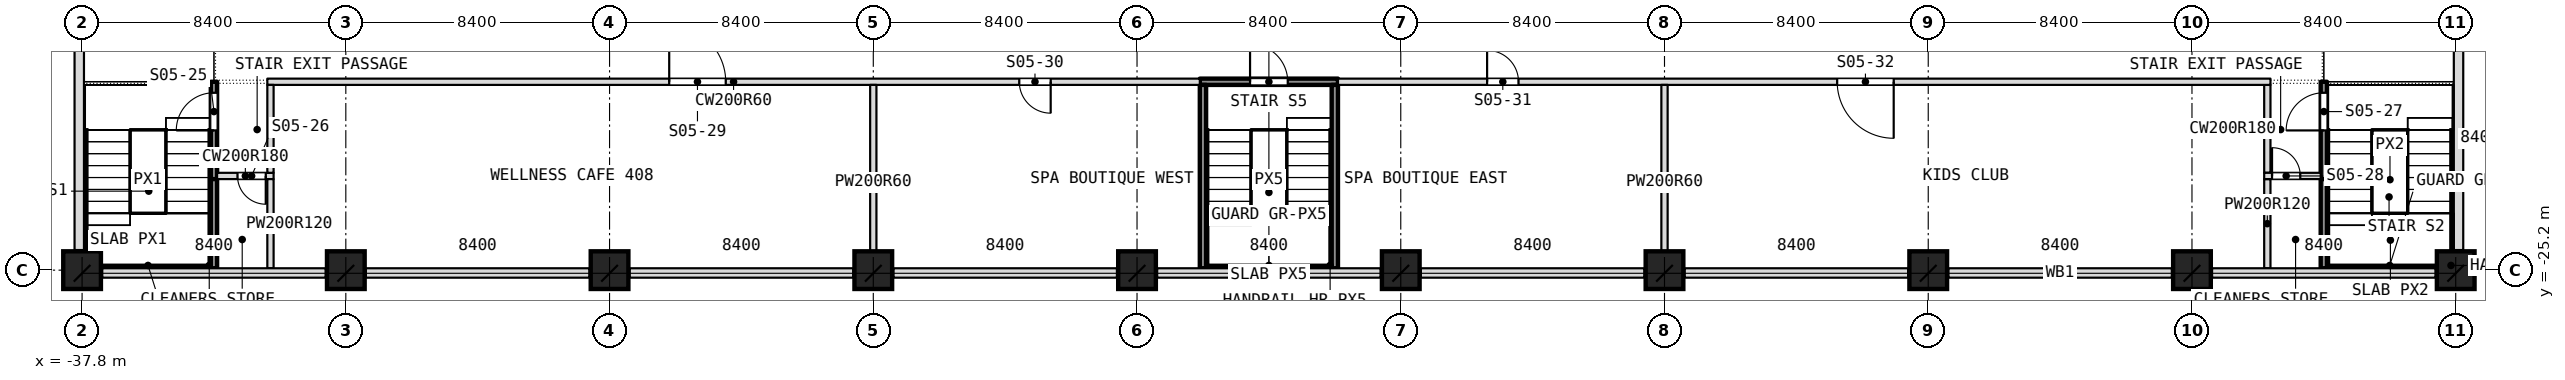
"""IFC4 building model, lengths in metres.
Left out: names, types, materials, properties, quantities, classifications, styles, units other than length and angle.
Written with IfcOpenShell. Run it as: python <this file> out.ifc"""

import sys

from ifc_helpers import new_model, si_unit, direction, frame, frame_2d, origin, origin_2d, place, context, subcontext, project, spatial, polyline, rectangle, outline, extrude, element, fill, save


model = new_model("IFC4")
c1 = context("Model", 3, precision=1e-05, world=origin(), true_north=direction((0.0, 1.0)))
c2 = subcontext(c1, "Body", "Model", "MODEL_VIEW")
j1 = project(units=[si_unit("LENGTHUNIT", "METRE"), si_unit("PLANEANGLEUNIT", "RADIAN")], contexts=[c1])
p1 = place(None, origin())
s1 = spatial("IfcSite", under=j1, at=p1, CompositionType="ELEMENT")
p2 = place(p1, origin())
s2 = spatial("IfcBuilding", under=s1, at=p2, CompositionType="ELEMENT")
p3 = place(p2, frame((0.0, 0.0, 26.0)))
s3 = spatial("IfcBuildingStorey", under=s2, at=p3, CompositionType="ELEMENT", Elevation=26.0)
for number, where, z_axis, x_axis in (
    (1, (-37.8, -25.2, 0.0), (0.0, 0.0, 1.0), (1.0, 0.0, 0.0)),
    (2, (-29.4, -25.2, 0.0), (0.0, 0.0, 1.0), (1.0, 0.0, 0.0)),
    (3, (-21.0, -25.2, 0.0), (0.0, 0.0, 1.0), (1.0, 0.0, 0.0)),
    (4, (-12.6, -25.2, 0.0), (0.0, 0.0, 1.0), (1.0, 0.0, 0.0)),
    (5, (-4.2, -25.2, 0.0), (0.0, 0.0, 1.0), (1.0, 0.0, 0.0)),
    (6, (4.2, -25.2, 0.0), (0.0, 0.0, 1.0), (1.0, 0.0, 0.0)),
    (7, (12.6, -25.2, 0.0), (0.0, 0.0, 1.0), (1.0, 0.0, 0.0)),
    (8, (21.0, -25.2, 0.0), (0.0, 0.0, 1.0), (1.0, 0.0, 0.0)),
    (9, (29.4, -25.2, 0.0), (0.0, 0.0, 1.0), (1.0, 0.0, 0.0)),
    (10, (37.8, -25.2, 0.0), (0.0, 0.0, 1.0), (1.0, 0.0, 0.0)),
):
    element("IfcColumn", number, at=place(p3, frame(where, z_axis=z_axis, x_axis=x_axis)), inside=s3, PredefinedType="COLUMN", context=c2, shape_type="SweptSolid", body=[
        extrude(rectangle(XDim=1.2, YDim=1.2, at=origin_2d()), origin(), (0.0, 0.0, 1.0), 5.0),
    ])
p4 = place(p3, frame((37.8, 2.4, 0.0), z_axis=(1.0, 0.0, 0.0), x_axis=(0.0, 0.0, 1.0)))
e11 = element("IfcWall", 11, at=p4, inside=s3, PredefinedType="SOLIDWALL", context=c2, shape_type="SweptSolid", body=[
    extrude(outline(polyline([(0.0, 0.0), (4.68, 0.0), (4.68, 21.6), (0.0, 21.6), (0.0, 16.321), (0.541, 15.6), (1.199, 14.4), (1.65, 13.2), (1.913, 12.0), (2.0, 10.8), (1.913, 9.6), (1.65, 8.4), (1.199, 7.2), (0.541, 6.0), (0.0, 5.279), (0.0, 0.0)])), origin(), (0.0, 0.0, -1.0), 4.2),
])
p5 = place(p3, frame((-37.8, 2.4, 0.0), z_axis=(-1.0, 0.0, 0.0), x_axis=(0.0, -1.0, 0.0)))
e12 = element("IfcWall", 12, at=p5, inside=s3, PredefinedType="SOLIDWALL", context=c2, shape_type="SweptSolid", body=[
    extrude(outline(polyline([(0.0, 0.0), (5.279, 0.0), (6.0, 0.541), (7.2, 1.199), (8.4, 1.65), (9.6, 1.913), (10.8, 2.0), (12.0, 1.913), (13.2, 1.65), (14.4, 1.199), (15.6, 0.541), (16.321, 0.0), (21.6, 0.0), (21.6, 4.68), (0.0, 4.68), (0.0, 0.0)])), origin(), (0.0, 0.0, -1.0), 4.2),
])
p6 = place(p3, frame((33.6, -25.14, 0.0), z_axis=(0.0, 0.0, 1.0), x_axis=(0.0, 1.0, 0.0)))
e13 = element("IfcWall", 13, at=p6, inside=s3, PredefinedType="PARTITIONING", context=c2, shape_type="SweptSolid", body=[
    extrude(rectangle(XDim=3.04, YDim=0.2, at=frame_2d((1.52, 0.0))), origin(), (0.0, 0.0, 1.0), 4.68),
])
p7 = place(p3, frame((33.6, -22.3, 0.0), z_axis=(0.0, 0.0, 1.0), x_axis=(0.0, 1.0, 0.0)))
e14 = element("IfcWall", 14, at=p7, inside=s3, PredefinedType="PARTITIONING", context=c2, shape_type="SweptSolid", body=[
    extrude(rectangle(XDim=3.1, YDim=0.2, at=frame_2d((1.55, 0.0))), origin(), (0.0, 0.0, 1.0), 4.68),
])
p8 = place(p7, frame((1.55, 0.0, 0.0)))
e15 = element("IfcOpeningElement", 15, at=p8, cuts=e14, PredefinedType="OPENING", context=c2, shape_type="SweptSolid", body=[
    extrude(rectangle(XDim=1.2, YDim=2.1, at=frame_2d((0.6, 1.05))), frame((0.0, 0.1, 0.0), z_axis=(0.0, -1.0, 0.0), x_axis=(1.0, 0.0, 0.0)), (0.0, 0.0, 1.0), 0.2),
])
p9 = place(p3, frame((31.8, -25.14, 0.0), z_axis=(0.0, 0.0, 1.0), x_axis=(0.0, 1.0, 0.0)))
e16 = element("IfcWall", 16, at=p9, inside=s3, PredefinedType="PARTITIONING", context=c2, shape_type="SweptSolid", body=[
    extrude(rectangle(XDim=2.84, YDim=0.2, at=frame_2d((1.42, 0.0))), origin(), (0.0, 0.0, 1.0), 4.68),
])
p10 = place(p3, frame((31.8, -22.1, 0.0), z_axis=(0.0, 0.0, 1.0), x_axis=(0.0, 1.0, 0.0)))
e17 = element("IfcWall", 17, at=p10, inside=s3, PredefinedType="PARTITIONING", context=c2, shape_type="SweptSolid", body=[
    extrude(rectangle(XDim=2.8, YDim=0.2, at=frame_2d((1.4, 0.0))), origin(), (0.0, 0.0, 1.0), 4.68),
])
p11 = place(p3, frame((-33.5, -22.2, 0.0), z_axis=(0.0, 0.0, 1.0), x_axis=(1.0, 0.0, 0.0)))
e18 = element("IfcWall", 18, at=p11, inside=s3, PredefinedType="PARTITIONING", context=c2, shape_type="SweptSolid", body=[
    extrude(rectangle(XDim=1.8, YDim=0.2, at=frame_2d((0.9, 0.0))), origin(), (0.0, 0.0, 1.0), 4.68),
])
p12 = place(p11, frame((0.65, 0.0, 0.0)))
e19 = element("IfcOpeningElement", 19, at=p12, cuts=e18, PredefinedType="OPENING", context=c2, shape_type="SweptSolid", body=[
    extrude(rectangle(XDim=0.9, YDim=2.1, at=frame_2d((0.45, 1.05))), frame((0.0, 0.1, 0.0), z_axis=(0.0, -1.0, 0.0), x_axis=(1.0, 0.0, 0.0)), (0.0, 0.0, 1.0), 0.2),
])
p13 = place(p3, frame((31.7, -22.2, 0.0), z_axis=(0.0, 0.0, 1.0), x_axis=(1.0, 0.0, 0.0)))
e20 = element("IfcWall", 20, at=p13, inside=s3, PredefinedType="PARTITIONING", context=c2, shape_type="SweptSolid", body=[
    extrude(rectangle(XDim=1.8, YDim=0.2, at=frame_2d((0.9, 0.0))), origin(), (0.0, 0.0, 1.0), 4.68),
])
p14 = place(p13, frame((0.25, 0.0, 0.0)))
e21 = element("IfcOpeningElement", 21, at=p14, cuts=e20, PredefinedType="OPENING", context=c2, shape_type="SweptSolid", body=[
    extrude(rectangle(XDim=0.9, YDim=2.1, at=frame_2d((0.45, 1.05))), frame((0.0, 0.1, 0.0), z_axis=(0.0, -1.0, 0.0), x_axis=(1.0, 0.0, 0.0)), (0.0, 0.0, 1.0), 0.2),
])
p15 = place(p3, frame((-31.9, -19.2, 0.0), z_axis=(0.0, 0.0, 1.0), x_axis=(1.0, 0.0, 0.0)))
e22 = element("IfcWall", 22, at=p15, inside=s3, PredefinedType="PARTITIONING", context=c2, shape_type="SweptSolid", body=[
    extrude(rectangle(XDim=29.7, YDim=0.2, at=frame_2d((14.85, 0.0))), origin(), (0.0, 0.0, 1.0), 4.68),
])
p16 = place(p15, frame((12.8, 0.0, 0.0)))
e23 = element("IfcOpeningElement", 23, at=p16, cuts=e22, PredefinedType="OPENING", context=c2, shape_type="SweptSolid", body=[
    extrude(rectangle(XDim=1.8, YDim=2.1, at=frame_2d((0.9, 1.05))), frame((0.0, 0.1, 0.0), z_axis=(0.0, -1.0, 0.0), x_axis=(1.0, 0.0, 0.0)), (0.0, 0.0, 1.0), 0.2),
])
p17 = place(p15, frame((23.95, 0.0, 0.0)))
e24 = element("IfcOpeningElement", 24, at=p17, cuts=e22, PredefinedType="OPENING", context=c2, shape_type="SweptSolid", body=[
    extrude(rectangle(XDim=1.0, YDim=2.1, at=frame_2d((0.5, 1.05))), frame((0.0, 0.1, 0.0), z_axis=(0.0, -1.0, 0.0), x_axis=(1.0, 0.0, 0.0)), (0.0, 0.0, 1.0), 0.2),
])
p18 = place(p3, frame((2.2, -19.2, 0.0), z_axis=(0.0, 0.0, 1.0), x_axis=(1.0, 0.0, 0.0)))
e25 = element("IfcWall", 25, at=p18, inside=s3, PredefinedType="PARTITIONING", context=c2, shape_type="SweptSolid", body=[
    extrude(rectangle(XDim=29.7, YDim=0.2, at=frame_2d((14.85, 0.0))), origin(), (0.0, 0.0, 1.0), 4.68),
])
p19 = place(p18, frame((4.75, 0.0, 0.0)))
e26 = element("IfcOpeningElement", 26, at=p19, cuts=e25, PredefinedType="OPENING", context=c2, shape_type="SweptSolid", body=[
    extrude(rectangle(XDim=1.0, YDim=2.1, at=frame_2d((0.5, 1.05))), frame((0.0, 0.1, 0.0), z_axis=(0.0, -1.0, 0.0), x_axis=(1.0, 0.0, 0.0)), (0.0, 0.0, 1.0), 0.2),
])
p20 = place(p18, frame((15.9, 0.0, 0.0)))
e27 = element("IfcOpeningElement", 27, at=p20, cuts=e25, PredefinedType="OPENING", context=c2, shape_type="SweptSolid", body=[
    extrude(rectangle(XDim=1.8, YDim=2.1, at=frame_2d((0.9, 1.05))), frame((0.0, 0.1, 0.0), z_axis=(0.0, -1.0, 0.0), x_axis=(1.0, 0.0, 0.0)), (0.0, 0.0, 1.0), 0.2),
])
p21 = place(p3, frame((-2.2, -19.2, 0.0), z_axis=(0.0, 0.0, 1.0), x_axis=(1.0, 0.0, 0.0)))
e28 = element("IfcWall", 28, at=p21, inside=s3, PredefinedType="PARTITIONING", context=c2, shape_type="SweptSolid", body=[
    extrude(rectangle(XDim=4.4, YDim=0.2, at=frame_2d((2.2, 0.0))), origin(), (0.0, 0.0, 1.0), 4.68),
])
p22 = place(p21, frame((1.6, 0.0, 0.0)))
e29 = element("IfcOpeningElement", 29, at=p22, cuts=e28, PredefinedType="OPENING", context=c2, shape_type="SweptSolid", body=[
    extrude(rectangle(XDim=1.2, YDim=2.1, at=frame_2d((0.6, 1.05))), frame((0.0, 0.1, 0.0), z_axis=(0.0, -1.0, 0.0), x_axis=(1.0, 0.0, 0.0)), (0.0, 0.0, 1.0), 0.2),
])
p23 = place(p3, frame((12.6, -25.5, 0.0), z_axis=(0.0, 0.0, 1.0), x_axis=(0.0, 1.0, 0.0)))
e30 = element("IfcWall", 30, at=p23, inside=s3, PredefinedType="PARTITIONING", context=c2, shape_type="SweptSolid", body=[
    extrude(rectangle(XDim=6.2, YDim=0.2, at=frame_2d((3.1, 0.0))), origin(), (0.0, 0.0, 1.0), 4.68),
])
for number, where, z_axis, x_axis in (
    (31, (2.1, -25.14, 0.0), (0.0, 0.0, 1.0), (0.0, 1.0, 0.0)),
    (32, (-2.1, -25.14, 0.0), (0.0, 0.0, 1.0), (0.0, 1.0, 0.0)),
):
    element("IfcWall", number, at=place(p3, frame(where, z_axis=z_axis, x_axis=x_axis)), inside=s3, PredefinedType="PARTITIONING", context=c2, shape_type="SweptSolid", body=[
        extrude(rectangle(XDim=5.84, YDim=0.2, at=frame_2d((2.92, 0.0))), origin(), (0.0, 0.0, 1.0), 4.68),
    ])
p24 = place(p3, frame((-12.6, -25.5, 0.0), z_axis=(0.0, 0.0, 1.0), x_axis=(0.0, 1.0, 0.0)))
e33 = element("IfcWall", 33, at=p24, inside=s3, PredefinedType="PARTITIONING", context=c2, shape_type="SweptSolid", body=[
    extrude(rectangle(XDim=6.2, YDim=0.2, at=frame_2d((3.1, 0.0))), origin(), (0.0, 0.0, 1.0), 4.68),
])
p25 = place(p3, frame((-31.8, -25.14, 0.0), z_axis=(0.0, 0.0, 1.0), x_axis=(0.0, 1.0, 0.0)))
e34 = element("IfcWall", 34, at=p25, inside=s3, PredefinedType="PARTITIONING", context=c2, shape_type="SweptSolid", body=[
    extrude(rectangle(XDim=2.84, YDim=0.2, at=frame_2d((1.42, 0.0))), origin(), (0.0, 0.0, 1.0), 4.68),
])
p26 = place(p3, frame((-31.8, -22.1, 0.0), z_axis=(0.0, 0.0, 1.0), x_axis=(0.0, 1.0, 0.0)))
e35 = element("IfcWall", 35, at=p26, inside=s3, PredefinedType="PARTITIONING", context=c2, shape_type="SweptSolid", body=[
    extrude(rectangle(XDim=2.8, YDim=0.2, at=frame_2d((1.4, 0.0))), origin(), (0.0, 0.0, 1.0), 4.68),
])
p27 = place(p3, frame((-33.6, -25.14, 0.0), z_axis=(0.0, 0.0, 1.0), x_axis=(0.0, 1.0, 0.0)))
e36 = element("IfcWall", 36, at=p27, inside=s3, PredefinedType="PARTITIONING", context=c2, shape_type="SweptSolid", body=[
    extrude(rectangle(XDim=3.04, YDim=0.2, at=frame_2d((1.52, 0.0))), origin(), (0.0, 0.0, 1.0), 4.68),
])
p28 = place(p3, frame((-33.6, -22.3, 0.0), z_axis=(0.0, 0.0, 1.0), x_axis=(0.0, 1.0, 0.0)))
e37 = element("IfcWall", 37, at=p28, inside=s3, PredefinedType="PARTITIONING", context=c2, shape_type="SweptSolid", body=[
    extrude(rectangle(XDim=3.1, YDim=0.2, at=frame_2d((1.55, 0.0))), origin(), (0.0, 0.0, 1.0), 4.68),
])
p29 = place(p28, frame((1.55, 0.0, 0.0)))
e38 = element("IfcOpeningElement", 38, at=p29, cuts=e37, PredefinedType="OPENING", context=c2, shape_type="SweptSolid", body=[
    extrude(rectangle(XDim=1.2, YDim=2.1, at=frame_2d((0.6, 1.05))), frame((0.0, 0.1, 0.0), z_axis=(0.0, -1.0, 0.0), x_axis=(1.0, 0.0, 0.0)), (0.0, 0.0, 1.0), 0.2),
])
p30 = place(p3, frame((-37.16, -25.29, 0.0), z_axis=(0.0, 0.0, 1.0), x_axis=(1.0, 0.0, 0.0)))
e39 = element("IfcWall", 39, at=p30, inside=s3, PredefinedType="NOTDEFINED", context=c2, shape_type="SweptSolid", body=[
    extrude(rectangle(XDim=7.12, YDim=0.3, at=frame_2d((3.56, 0.0))), origin(), (0.0, 0.0, 1.0), 3.78),
])
for number, where, z_axis, x_axis in (
    (40, (-28.76, -25.29, 0.0), (0.0, 0.0, 1.0), (1.0, 0.0, 0.0)),
    (41, (-20.36, -25.29, 0.0), (0.0, 0.0, 1.0), (1.0, 0.0, 0.0)),
):
    element("IfcWall", number, at=place(p3, frame(where, z_axis=z_axis, x_axis=x_axis)), inside=s3, PredefinedType="NOTDEFINED", context=c2, shape_type="SweptSolid", body=[
        extrude(rectangle(XDim=7.12, YDim=0.3, at=frame_2d((3.56, 0.0))), origin(), (0.0, 0.0, 1.0), 3.78),
    ])
p31 = place(p3, frame((-11.96, -25.29, 0.0), z_axis=(0.0, 0.0, 1.0), x_axis=(1.0, 0.0, 0.0)))
e42 = element("IfcWall", 42, at=p31, inside=s3, PredefinedType="NOTDEFINED", context=c2, shape_type="SweptSolid", body=[
    extrude(rectangle(XDim=7.12, YDim=0.3, at=frame_2d((3.56, 0.0))), origin(), (0.0, 0.0, 1.0), 3.78),
])
p32 = place(p3, frame((-3.56, -25.29, 0.0), z_axis=(0.0, 0.0, 1.0), x_axis=(1.0, 0.0, 0.0)))
e43 = element("IfcWall", 43, at=p32, inside=s3, PredefinedType="NOTDEFINED", context=c2, shape_type="SweptSolid", body=[
    extrude(rectangle(XDim=7.12, YDim=0.3, at=frame_2d((3.56, 0.0))), origin(), (0.0, 0.0, 1.0), 3.78),
])
p33 = place(p3, frame((4.84, -25.29, 0.0), z_axis=(0.0, 0.0, 1.0), x_axis=(1.0, 0.0, 0.0)))
e44 = element("IfcWall", 44, at=p33, inside=s3, PredefinedType="NOTDEFINED", context=c2, shape_type="SweptSolid", body=[
    extrude(rectangle(XDim=7.12, YDim=0.3, at=frame_2d((3.56, 0.0))), origin(), (0.0, 0.0, 1.0), 3.78),
])
for number, where, z_axis, x_axis in (
    (45, (13.24, -25.29, 0.0), (0.0, 0.0, 1.0), (1.0, 0.0, 0.0)),
    (46, (21.64, -25.29, 0.0), (0.0, 0.0, 1.0), (1.0, 0.0, 0.0)),
):
    element("IfcWall", number, at=place(p3, frame(where, z_axis=z_axis, x_axis=x_axis)), inside=s3, PredefinedType="NOTDEFINED", context=c2, shape_type="SweptSolid", body=[
        extrude(rectangle(XDim=7.12, YDim=0.3, at=frame_2d((3.56, 0.0))), origin(), (0.0, 0.0, 1.0), 3.78),
    ])
p34 = place(p3, frame((30.04, -25.29, 0.0), z_axis=(0.0, 0.0, 1.0), x_axis=(1.0, 0.0, 0.0)))
e47 = element("IfcWall", 47, at=p34, inside=s3, PredefinedType="NOTDEFINED", context=c2, shape_type="SweptSolid", body=[
    extrude(rectangle(XDim=7.12, YDim=0.3, at=frame_2d((3.56, 0.0))), origin(), (0.0, 0.0, 1.0), 3.78),
])
for number, where, z_axis, x_axis in (
    (48, (37.89, -24.56, 0.0), (0.0, 0.0, 1.0), (0.0, 1.0, 0.0)),
    (49, (-37.89, -16.8, 0.0), (0.0, 0.0, 1.0), (0.0, -1.0, 0.0)),
):
    element("IfcWall", number, at=place(p3, frame(where, z_axis=z_axis, x_axis=x_axis)), inside=s3, PredefinedType="NOTDEFINED", context=c2, shape_type="SweptSolid", body=[
        extrude(rectangle(XDim=7.76, YDim=0.3, at=frame_2d((3.88, 0.0))), origin(), (0.0, 0.0, 1.0), 3.78),
    ])
p35 = place(p29, origin())
e50 = element("IfcDoor", 50, at=p35, inside=s3, OperationType="SINGLE_SWING_RIGHT", PredefinedType="DOOR", context=c2, shape_type="SweptSolid", body=[
    extrude(rectangle(XDim=1.2, YDim=2.1, at=frame_2d((0.6, 1.05))), frame((0.0, 0.025, 0.0), z_axis=(0.0, -1.0, 0.0), x_axis=(1.0, 0.0, 0.0)), (0.0, 0.0, 1.0), 0.05),
])
fill(e38, e50)
p36 = place(p12, origin())
e51 = element("IfcDoor", 51, at=p36, inside=s3, OperationType="SINGLE_SWING_LEFT", PredefinedType="DOOR", context=c2, shape_type="SweptSolid", body=[
    extrude(rectangle(XDim=0.9, YDim=2.1, at=frame_2d((0.45, 1.05))), frame((0.0, 0.025, 0.0), z_axis=(0.0, -1.0, 0.0), x_axis=(1.0, 0.0, 0.0)), (0.0, 0.0, 1.0), 0.05),
])
fill(e19, e51)
p37 = place(p8, origin())
e52 = element("IfcDoor", 52, at=p37, inside=s3, OperationType="SINGLE_SWING_LEFT", PredefinedType="DOOR", context=c2, shape_type="SweptSolid", body=[
    extrude(rectangle(XDim=1.2, YDim=2.1, at=frame_2d((0.6, 1.05))), frame((0.0, 0.025, 0.0), z_axis=(0.0, -1.0, 0.0), x_axis=(1.0, 0.0, 0.0)), (0.0, 0.0, 1.0), 0.05),
])
fill(e15, e52)
p38 = place(p14, origin())
e53 = element("IfcDoor", 53, at=p38, inside=s3, OperationType="SINGLE_SWING_RIGHT", PredefinedType="DOOR", context=c2, shape_type="SweptSolid", body=[
    extrude(rectangle(XDim=0.9, YDim=2.1, at=frame_2d((0.45, 1.05))), frame((0.0, 0.025, 0.0), z_axis=(0.0, -1.0, 0.0), x_axis=(1.0, 0.0, 0.0)), (0.0, 0.0, 1.0), 0.05),
])
fill(e21, e53)
p39 = place(p16, origin())
e54 = element("IfcDoor", 54, at=p39, inside=s3, OperationType="DOUBLE_DOOR_SINGLE_SWING", PredefinedType="DOOR", context=c2, shape_type="SweptSolid", body=[
    extrude(rectangle(XDim=1.8, YDim=2.1, at=frame_2d((0.9, 1.05))), frame((0.0, 0.025, 0.0), z_axis=(0.0, -1.0, 0.0), x_axis=(1.0, 0.0, 0.0)), (0.0, 0.0, 1.0), 0.05),
])
fill(e23, e54)
p40 = place(p17, origin())
e55 = element("IfcDoor", 55, at=p40, inside=s3, OperationType="SINGLE_SWING_RIGHT", PredefinedType="DOOR", context=c2, shape_type="SweptSolid", body=[
    extrude(rectangle(XDim=1.0, YDim=2.1, at=frame_2d((0.5, 1.05))), frame((0.0, 0.025, 0.0), z_axis=(0.0, -1.0, 0.0), x_axis=(1.0, 0.0, 0.0)), (0.0, 0.0, 1.0), 0.05),
])
fill(e24, e55)
p41 = place(p19, origin())
e56 = element("IfcDoor", 56, at=p41, inside=s3, OperationType="SINGLE_SWING_LEFT", PredefinedType="DOOR", context=c2, shape_type="SweptSolid", body=[
    extrude(rectangle(XDim=1.0, YDim=2.1, at=frame_2d((0.5, 1.05))), frame((0.0, 0.025, 0.0), z_axis=(0.0, -1.0, 0.0), x_axis=(1.0, 0.0, 0.0)), (0.0, 0.0, 1.0), 0.05),
])
fill(e26, e56)
p42 = place(p20, origin())
e57 = element("IfcDoor", 57, at=p42, inside=s3, OperationType="DOUBLE_DOOR_SINGLE_SWING", PredefinedType="DOOR", context=c2, shape_type="SweptSolid", body=[
    extrude(rectangle(XDim=1.8, YDim=2.1, at=frame_2d((0.9, 1.05))), frame((0.0, 0.025, 0.0), z_axis=(0.0, -1.0, 0.0), x_axis=(1.0, 0.0, 0.0)), (0.0, 0.0, 1.0), 0.05),
])
fill(e27, e57)
p43 = place(p22, origin())
e58 = element("IfcDoor", 58, at=p43, inside=s3, OperationType="SINGLE_SWING_LEFT", PredefinedType="DOOR", context=c2, shape_type="SweptSolid", body=[
    extrude(rectangle(XDim=1.2, YDim=2.1, at=frame_2d((0.6, 1.05))), frame((0.0, 0.025, 0.0), z_axis=(0.0, -1.0, 0.0), x_axis=(1.0, 0.0, 0.0)), (0.0, 0.0, 1.0), 0.05),
])
fill(e29, e58)
save(model, sys.argv[1])
